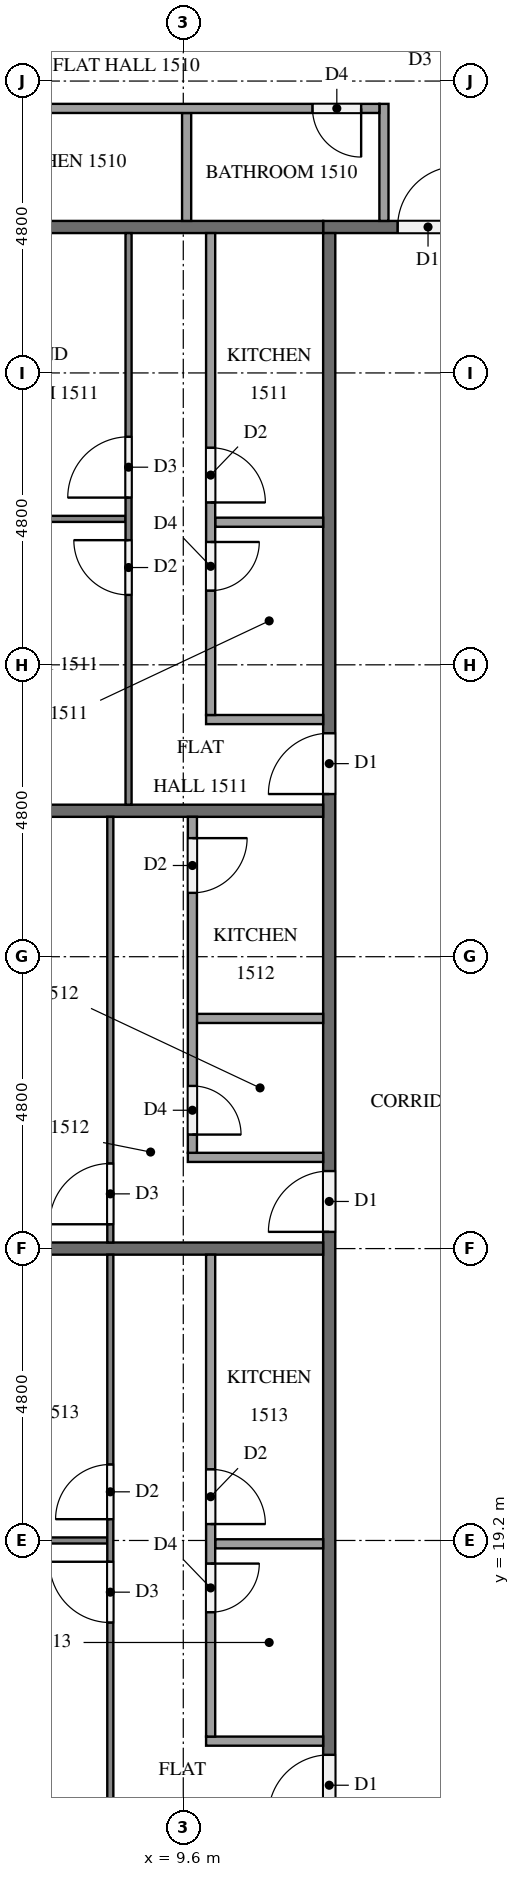
"""IFC4 building model, lengths in metres.
Left out: names, types, materials, properties, quantities, classifications, styles, units other than length and angle.
Written with IfcOpenShell. Run it as: python <this file> out.ifc"""

import sys

from ifc_helpers import new_model, si_unit, direction, frame, frame_2d, origin, place, context, subcontext, project, spatial, rectangle, extrude, element, fill, save


model = new_model("IFC4")
c1 = context("Model", 3, precision=1e-05, world=origin(), true_north=direction((0.0, 1.0)))
c2 = subcontext(c1, "Body", "Model", "MODEL_VIEW")
j1 = project(units=[si_unit("LENGTHUNIT", "METRE"), si_unit("PLANEANGLEUNIT", "RADIAN")], contexts=[c1])
p1 = place(None, origin())
s1 = spatial("IfcSite", under=j1, at=p1, CompositionType="ELEMENT")
p2 = place(p1, origin())
s2 = spatial("IfcBuilding", under=s1, at=p2, CompositionType="ELEMENT")
p3 = place(p2, frame((0.0, 0.0, 62.8)))
s3 = spatial("IfcBuildingStorey", under=s2, at=p3, CompositionType="ELEMENT", Elevation=62.8)
p4 = place(p3, frame((11.9, 40.8, 0.0), z_axis=(0.0, 0.0, 1.0), x_axis=(1.0, 0.0, 0.0)))
e1 = element("IfcWall", 1, at=p4, inside=s3, PredefinedType="PARTITIONING", context=c2, shape_type="SweptSolid", body=[
    extrude(rectangle(XDim=38.6, YDim=0.2, at=frame_2d((19.3, 0.0))), origin(), (0.0, 0.0, 1.0), 3.2),
])
p5 = place(p4, frame((36.375, 0.0, 0.0)))
e2 = element("IfcOpeningElement", 2, at=p5, cuts=e1, PredefinedType="OPENING", context=c2, shape_type="SweptSolid", body=[
    extrude(rectangle(XDim=1.0, YDim=2.1, at=frame_2d((0.5, 1.05))), frame((0.0, 0.11, 0.0), z_axis=(0.0, -1.0, 0.0), x_axis=(1.0, 0.0, 0.0)), (0.0, 0.0, 1.0), 0.22),
])
p6 = place(p4, frame((17.125, 0.0, 0.0)))
e3 = element("IfcOpeningElement", 3, at=p6, cuts=e1, PredefinedType="OPENING", context=c2, shape_type="SweptSolid", body=[
    extrude(rectangle(XDim=1.1, YDim=2.1, at=frame_2d((0.55, 1.05))), frame((0.0, 0.11, 0.0), z_axis=(0.0, -1.0, 0.0), x_axis=(1.0, 0.0, 0.0)), (0.0, 0.0, 1.0), 0.22),
])
p7 = place(p4, frame((15.625, 0.0, 0.0)))
e4 = element("IfcOpeningElement", 4, at=p7, cuts=e1, PredefinedType="OPENING", context=c2, shape_type="SweptSolid", body=[
    extrude(rectangle(XDim=1.0, YDim=2.1, at=frame_2d((0.5, 1.05))), frame((0.0, 0.11, 0.0), z_axis=(0.0, -1.0, 0.0), x_axis=(1.0, 0.0, 0.0)), (0.0, 0.0, 1.0), 0.22),
])
p8 = place(p4, frame((1.225, 0.0, 0.0)))
e5 = element("IfcOpeningElement", 5, at=p8, cuts=e1, PredefinedType="OPENING", context=c2, shape_type="SweptSolid", body=[
    extrude(rectangle(XDim=1.0, YDim=2.1, at=frame_2d((0.5, 1.05))), frame((0.0, 0.11, 0.0), z_axis=(0.0, -1.0, 0.0), x_axis=(1.0, 0.0, 0.0)), (0.0, 0.0, 1.0), 0.22),
])
p9 = place(p3, frame((12.0, 12.1, 0.0), z_axis=(0.0, 0.0, 1.0), x_axis=(0.0, 1.0, 0.0)))
e6 = element("IfcWall", 6, at=p9, inside=s3, PredefinedType="PARTITIONING", context=c2, shape_type="SweptSolid", body=[
    extrude(rectangle(XDim=28.6, YDim=0.2, at=frame_2d((14.3, 0.0))), origin(), (0.0, 0.0, 1.0), 3.2),
])
p10 = place(p9, frame((19.375, 0.0, 0.0)))
e7 = element("IfcOpeningElement", 7, at=p10, cuts=e6, PredefinedType="OPENING", context=c2, shape_type="SweptSolid", body=[
    extrude(rectangle(XDim=1.0, YDim=2.1, at=frame_2d((0.5, 1.05))), frame((0.0, 0.11, 0.0), z_axis=(0.0, -1.0, 0.0), x_axis=(1.0, 0.0, 0.0)), (0.0, 0.0, 1.0), 0.22),
])
p11 = place(p9, frame((12.175, 0.0, 0.0)))
e8 = element("IfcOpeningElement", 8, at=p11, cuts=e6, PredefinedType="OPENING", context=c2, shape_type="SweptSolid", body=[
    extrude(rectangle(XDim=1.0, YDim=2.1, at=frame_2d((0.5, 1.05))), frame((0.0, 0.11, 0.0), z_axis=(0.0, -1.0, 0.0), x_axis=(1.0, 0.0, 0.0)), (0.0, 0.0, 1.0), 0.22),
])
p12 = place(p9, frame((2.575, 0.0, 0.0)))
e9 = element("IfcOpeningElement", 9, at=p12, cuts=e6, PredefinedType="OPENING", context=c2, shape_type="SweptSolid", body=[
    extrude(rectangle(XDim=1.0, YDim=2.1, at=frame_2d((0.5, 1.05))), frame((0.0, 0.11, 0.0), z_axis=(0.0, -1.0, 0.0), x_axis=(1.0, 0.0, 0.0)), (0.0, 0.0, 1.0), 0.22),
])
p13 = place(p9, frame((1.025, 0.0, 0.0)))
e10 = element("IfcOpeningElement", 10, at=p13, cuts=e6, PredefinedType="OPENING", context=c2, shape_type="SweptSolid", body=[
    extrude(rectangle(XDim=1.0, YDim=2.1, at=frame_2d((0.5, 1.05))), frame((0.0, 0.11, 0.0), z_axis=(0.0, -1.0, 0.0), x_axis=(1.0, 0.0, 0.0)), (0.0, 0.0, 1.0), 0.22),
])
for number, where, z_axis, x_axis in (
    (11, (4.9, 40.8, 0.0), (0.0, 0.0, 1.0), (1.0, 0.0, 0.0)),
    (12, (4.9, 31.2, 0.0), (0.0, 0.0, 1.0), (1.0, 0.0, 0.0)),
):
    element("IfcWall", number, at=place(p3, frame(where, z_axis=z_axis, x_axis=x_axis)), inside=s3, PredefinedType="PARTITIONING", context=c2, shape_type="SweptSolid", body=[
        extrude(rectangle(XDim=7.0, YDim=0.2, at=frame_2d((3.5, 0.0))), origin(), (0.0, 0.0, 1.0), 3.2),
    ])
p14 = place(p3, frame((5.225, 24.0, 0.0), z_axis=(0.0, 0.0, 1.0), x_axis=(1.0, 0.0, 0.0)))
e13 = element("IfcWall", 13, at=p14, inside=s3, PredefinedType="PARTITIONING", context=c2, shape_type="SweptSolid", body=[
    extrude(rectangle(XDim=6.675, YDim=0.2, at=frame_2d((3.337, 0.0))), origin(), (0.0, 0.0, 1.0), 3.2),
])
p15 = place(p3, frame((9.655, 40.9, 0.0), z_axis=(0.0, 0.0, 1.0), x_axis=(0.0, 1.0, 0.0)))
e14 = element("IfcWall", 14, at=p15, inside=s3, PredefinedType="PARTITIONING", context=c2, shape_type="SweptSolid", body=[
    extrude(rectangle(XDim=1.775, YDim=0.15, at=frame_2d((0.888, 0.0))), origin(), (0.0, 0.0, 1.0), 3.2),
])
p16 = place(p3, frame((12.9, 40.9, 0.0), z_axis=(0.0, 0.0, 1.0), x_axis=(0.0, 1.0, 0.0)))
e15 = element("IfcWall", 15, at=p16, inside=s3, PredefinedType="PARTITIONING", context=c2, shape_type="SweptSolid", body=[
    extrude(rectangle(XDim=1.925, YDim=0.15, at=frame_2d((0.962, 0.0))), origin(), (0.0, 0.0, 1.0), 3.2),
])
p17 = place(p3, frame((12.825, 42.75, 0.0), z_axis=(0.0, 0.0, 1.0), x_axis=(-1.0, 0.0, 0.0)))
e16 = element("IfcWall", 16, at=p17, inside=s3, PredefinedType="PARTITIONING", context=c2, shape_type="SweptSolid", body=[
    extrude(rectangle(XDim=7.45, YDim=0.15, at=frame_2d((3.725, 0.0))), origin(), (0.0, 0.0, 1.0), 3.2),
])
p18 = place(p17, frame((0.3, 0.0, 0.0)))
e17 = element("IfcOpeningElement", 17, at=p18, cuts=e16, PredefinedType="OPENING", context=c2, shape_type="SweptSolid", body=[
    extrude(rectangle(XDim=0.8, YDim=2.1, at=frame_2d((0.4, 1.05))), frame((0.0, 0.085, 0.0), z_axis=(0.0, -1.0, 0.0), x_axis=(1.0, 0.0, 0.0)), (0.0, 0.0, 1.0), 0.17),
])
p19 = place(p17, frame((6.25, 0.0, 0.0)))
e18 = element("IfcOpeningElement", 18, at=p19, cuts=e16, PredefinedType="OPENING", context=c2, shape_type="SweptSolid", body=[
    extrude(rectangle(XDim=0.9, YDim=2.1, at=frame_2d((0.45, 1.05))), frame((0.0, 0.085, 0.0), z_axis=(0.0, -1.0, 0.0), x_axis=(1.0, 0.0, 0.0)), (0.0, 0.0, 1.0), 0.17),
])
p20 = place(p3, frame((8.65, 36.0, 0.0), z_axis=(0.0, 0.0, 1.0), x_axis=(-1.0, 0.0, 0.0)))
e19 = element("IfcWall", 19, at=p20, inside=s3, PredefinedType="PARTITIONING", context=c2, shape_type="SweptSolid", body=[
    extrude(rectangle(XDim=3.75, YDim=0.1, at=frame_2d((1.875, 0.0))), origin(), (0.0, 0.0, 1.0), 3.2),
])
p21 = place(p3, frame((8.7, 31.3, 0.0), z_axis=(0.0, 0.0, 1.0), x_axis=(0.0, 1.0, 0.0)))
e20 = element("IfcWall", 20, at=p21, inside=s3, PredefinedType="PARTITIONING", context=c2, shape_type="SweptSolid", body=[
    extrude(rectangle(XDim=9.4, YDim=0.1, at=frame_2d((4.7, 0.0))), origin(), (0.0, 0.0, 1.0), 3.2),
])
p22 = place(p21, frame((3.45, 0.0, 0.0)))
e21 = element("IfcOpeningElement", 21, at=p22, cuts=e20, PredefinedType="OPENING", context=c2, shape_type="SweptSolid", body=[
    extrude(rectangle(XDim=0.9, YDim=2.1, at=frame_2d((0.45, 1.05))), frame((0.0, 0.06, 0.0), z_axis=(0.0, -1.0, 0.0), x_axis=(1.0, 0.0, 0.0)), (0.0, 0.0, 1.0), 0.12),
])
p23 = place(p21, frame((5.05, 0.0, 0.0)))
e22 = element("IfcOpeningElement", 22, at=p23, cuts=e20, PredefinedType="OPENING", context=c2, shape_type="SweptSolid", body=[
    extrude(rectangle(XDim=1.0, YDim=2.1, at=frame_2d((0.5, 1.05))), frame((0.0, 0.06, 0.0), z_axis=(0.0, -1.0, 0.0), x_axis=(1.0, 0.0, 0.0)), (0.0, 0.0, 1.0), 0.12),
])
p24 = place(p3, frame((11.9, 35.945, 0.0), z_axis=(0.0, 0.0, 1.0), x_axis=(-1.0, 0.0, 0.0)))
e23 = element("IfcWall", 23, at=p24, inside=s3, PredefinedType="PARTITIONING", context=c2, shape_type="SweptSolid", body=[
    extrude(rectangle(XDim=1.775, YDim=0.15, at=frame_2d((0.887, 0.0))), origin(), (0.0, 0.0, 1.0), 3.2),
])
p25 = place(p3, frame((11.9, 32.7, 0.0), z_axis=(0.0, 0.0, 1.0), x_axis=(-1.0, 0.0, 0.0)))
e24 = element("IfcWall", 24, at=p25, inside=s3, PredefinedType="PARTITIONING", context=c2, shape_type="SweptSolid", body=[
    extrude(rectangle(XDim=1.925, YDim=0.15, at=frame_2d((0.962, 0.0))), origin(), (0.0, 0.0, 1.0), 3.2),
])
p26 = place(p3, frame((10.05, 40.7, 0.0), z_axis=(0.0, 0.0, 1.0), x_axis=(0.0, -1.0, 0.0)))
e25 = element("IfcWall", 25, at=p26, inside=s3, PredefinedType="PARTITIONING", context=c2, shape_type="SweptSolid", body=[
    extrude(rectangle(XDim=7.925, YDim=0.15, at=frame_2d((3.962, 0.0))), origin(), (0.0, 0.0, 1.0), 3.2),
])
p27 = place(p26, frame((5.08, 0.0, 0.0)))
e26 = element("IfcOpeningElement", 26, at=p27, cuts=e25, PredefinedType="OPENING", context=c2, shape_type="SweptSolid", body=[
    extrude(rectangle(XDim=0.8, YDim=2.1, at=frame_2d((0.4, 1.05))), frame((0.0, 0.085, 0.0), z_axis=(0.0, -1.0, 0.0), x_axis=(1.0, 0.0, 0.0)), (0.0, 0.0, 1.0), 0.17),
])
p28 = place(p26, frame((3.53, 0.0, 0.0)))
e27 = element("IfcOpeningElement", 27, at=p28, cuts=e25, PredefinedType="OPENING", context=c2, shape_type="SweptSolid", body=[
    extrude(rectangle(XDim=0.9, YDim=2.1, at=frame_2d((0.45, 1.05))), frame((0.0, 0.085, 0.0), z_axis=(0.0, -1.0, 0.0), x_axis=(1.0, 0.0, 0.0)), (0.0, 0.0, 1.0), 0.17),
])
p29 = place(p3, frame((8.4, 24.1, 0.0), z_axis=(0.0, 0.0, 1.0), x_axis=(0.0, 1.0, 0.0)))
e28 = element("IfcWall", 28, at=p29, inside=s3, PredefinedType="PARTITIONING", context=c2, shape_type="SweptSolid", body=[
    extrude(rectangle(XDim=7.0, YDim=0.1, at=frame_2d((3.5, 0.0))), origin(), (0.0, 0.0, 1.0), 3.2),
])
p30 = place(p29, frame((0.3, 0.0, 0.0)))
e29 = element("IfcOpeningElement", 29, at=p30, cuts=e28, PredefinedType="OPENING", context=c2, shape_type="SweptSolid", body=[
    extrude(rectangle(XDim=1.0, YDim=2.1, at=frame_2d((0.5, 1.05))), frame((0.0, 0.06, 0.0), z_axis=(0.0, -1.0, 0.0), x_axis=(1.0, 0.0, 0.0)), (0.0, 0.0, 1.0), 0.12),
])
p31 = place(p3, frame((11.9, 27.785, 0.0), z_axis=(0.0, 0.0, 1.0), x_axis=(-1.0, 0.0, 0.0)))
e30 = element("IfcWall", 30, at=p31, inside=s3, PredefinedType="PARTITIONING", context=c2, shape_type="SweptSolid", body=[
    extrude(rectangle(XDim=2.075, YDim=0.15, at=frame_2d((1.038, 0.0))), origin(), (0.0, 0.0, 1.0), 3.2),
])
p32 = place(p3, frame((11.9, 25.5, 0.0), z_axis=(0.0, 0.0, 1.0), x_axis=(-1.0, 0.0, 0.0)))
e31 = element("IfcWall", 31, at=p32, inside=s3, PredefinedType="PARTITIONING", context=c2, shape_type="SweptSolid", body=[
    extrude(rectangle(XDim=2.225, YDim=0.15, at=frame_2d((1.112, 0.0))), origin(), (0.0, 0.0, 1.0), 3.2),
])
p33 = place(p3, frame((9.75, 31.1, 0.0), z_axis=(0.0, 0.0, 1.0), x_axis=(0.0, -1.0, 0.0)))
e32 = element("IfcWall", 32, at=p33, inside=s3, PredefinedType="PARTITIONING", context=c2, shape_type="SweptSolid", body=[
    extrude(rectangle(XDim=5.525, YDim=0.15, at=frame_2d((2.763, 0.0))), origin(), (0.0, 0.0, 1.0), 3.2),
])
p34 = place(p33, frame((4.425, 0.0, 0.0)))
e33 = element("IfcOpeningElement", 33, at=p34, cuts=e32, PredefinedType="OPENING", context=c2, shape_type="SweptSolid", body=[
    extrude(rectangle(XDim=0.8, YDim=2.1, at=frame_2d((0.4, 1.05))), frame((0.0, 0.085, 0.0), z_axis=(0.0, -1.0, 0.0), x_axis=(1.0, 0.0, 0.0)), (0.0, 0.0, 1.0), 0.17),
])
p35 = place(p33, frame((0.35, 0.0, 0.0)))
e34 = element("IfcOpeningElement", 34, at=p35, cuts=e32, PredefinedType="OPENING", context=c2, shape_type="SweptSolid", body=[
    extrude(rectangle(XDim=0.9, YDim=2.1, at=frame_2d((0.45, 1.05))), frame((0.0, 0.085, 0.0), z_axis=(0.0, -1.0, 0.0), x_axis=(1.0, 0.0, 0.0)), (0.0, 0.0, 1.0), 0.17),
])
p36 = place(p3, frame((8.35, 19.2, 0.0), z_axis=(0.0, 0.0, 1.0), x_axis=(-1.0, 0.0, 0.0)))
e35 = element("IfcWall", 35, at=p36, inside=s3, PredefinedType="PARTITIONING", context=c2, shape_type="SweptSolid", body=[
    extrude(rectangle(XDim=3.45, YDim=0.1, at=frame_2d((1.725, 0.0))), origin(), (0.0, 0.0, 1.0), 3.2),
])
p37 = place(p3, frame((8.4, 14.5, 0.0), z_axis=(0.0, 0.0, 1.0), x_axis=(0.0, 1.0, 0.0)))
e36 = element("IfcWall", 36, at=p37, inside=s3, PredefinedType="PARTITIONING", context=c2, shape_type="SweptSolid", body=[
    extrude(rectangle(XDim=9.4, YDim=0.1, at=frame_2d((4.7, 0.0))), origin(), (0.0, 0.0, 1.0), 3.2),
])
p38 = place(p37, frame((3.35, 0.0, 0.0)))
e37 = element("IfcOpeningElement", 37, at=p38, cuts=e36, PredefinedType="OPENING", context=c2, shape_type="SweptSolid", body=[
    extrude(rectangle(XDim=1.0, YDim=2.1, at=frame_2d((0.5, 1.05))), frame((0.0, 0.06, 0.0), z_axis=(0.0, -1.0, 0.0), x_axis=(1.0, 0.0, 0.0)), (0.0, 0.0, 1.0), 0.12),
])
p39 = place(p37, frame((5.05, 0.0, 0.0)))
e38 = element("IfcOpeningElement", 38, at=p39, cuts=e36, PredefinedType="OPENING", context=c2, shape_type="SweptSolid", body=[
    extrude(rectangle(XDim=0.9, YDim=2.1, at=frame_2d((0.45, 1.05))), frame((0.0, 0.06, 0.0), z_axis=(0.0, -1.0, 0.0), x_axis=(1.0, 0.0, 0.0)), (0.0, 0.0, 1.0), 0.12),
])
p40 = place(p3, frame((11.9, 19.145, 0.0), z_axis=(0.0, 0.0, 1.0), x_axis=(-1.0, 0.0, 0.0)))
e39 = element("IfcWall", 39, at=p40, inside=s3, PredefinedType="PARTITIONING", context=c2, shape_type="SweptSolid", body=[
    extrude(rectangle(XDim=1.775, YDim=0.15, at=frame_2d((0.887, 0.0))), origin(), (0.0, 0.0, 1.0), 3.2),
])
p41 = place(p3, frame((11.9, 15.9, 0.0), z_axis=(0.0, 0.0, 1.0), x_axis=(-1.0, 0.0, 0.0)))
e40 = element("IfcWall", 40, at=p41, inside=s3, PredefinedType="PARTITIONING", context=c2, shape_type="SweptSolid", body=[
    extrude(rectangle(XDim=1.925, YDim=0.15, at=frame_2d((0.962, 0.0))), origin(), (0.0, 0.0, 1.0), 3.2),
])
p42 = place(p3, frame((10.05, 23.9, 0.0), z_axis=(0.0, 0.0, 1.0), x_axis=(0.0, -1.0, 0.0)))
e41 = element("IfcWall", 41, at=p42, inside=s3, PredefinedType="PARTITIONING", context=c2, shape_type="SweptSolid", body=[
    extrude(rectangle(XDim=7.925, YDim=0.15, at=frame_2d((3.962, 0.0))), origin(), (0.0, 0.0, 1.0), 3.2),
])
p43 = place(p42, frame((5.08, 0.0, 0.0)))
e42 = element("IfcOpeningElement", 42, at=p43, cuts=e41, PredefinedType="OPENING", context=c2, shape_type="SweptSolid", body=[
    extrude(rectangle(XDim=0.8, YDim=2.1, at=frame_2d((0.4, 1.05))), frame((0.0, 0.085, 0.0), z_axis=(0.0, -1.0, 0.0), x_axis=(1.0, 0.0, 0.0)), (0.0, 0.0, 1.0), 0.17),
])
p44 = place(p42, frame((3.53, 0.0, 0.0)))
e43 = element("IfcOpeningElement", 43, at=p44, cuts=e41, PredefinedType="OPENING", context=c2, shape_type="SweptSolid", body=[
    extrude(rectangle(XDim=0.9, YDim=2.1, at=frame_2d((0.45, 1.05))), frame((0.0, 0.085, 0.0), z_axis=(0.0, -1.0, 0.0), x_axis=(1.0, 0.0, 0.0)), (0.0, 0.0, 1.0), 0.17),
])
p45 = place(p8, origin())
e44 = element("IfcDoor", 44, at=p45, inside=s3, OperationType="SINGLE_SWING_RIGHT", PredefinedType="DOOR", context=c2, shape_type="SweptSolid", body=[
    extrude(rectangle(XDim=1.0, YDim=2.1, at=frame_2d((0.5, 1.05))), frame((0.0, 0.025, 0.0), z_axis=(0.0, -1.0, 0.0), x_axis=(1.0, 0.0, 0.0)), (0.0, 0.0, 1.0), 0.05),
])
fill(e5, e44)
p46 = place(p10, origin())
e45 = element("IfcDoor", 45, at=p46, inside=s3, OperationType="SINGLE_SWING_LEFT", PredefinedType="DOOR", context=c2, shape_type="SweptSolid", body=[
    extrude(rectangle(XDim=1.0, YDim=2.1, at=frame_2d((0.5, 1.05))), frame((0.0, 0.025, 0.0), z_axis=(0.0, -1.0, 0.0), x_axis=(1.0, 0.0, 0.0)), (0.0, 0.0, 1.0), 0.05),
])
fill(e7, e45)
p47 = place(p11, origin())
e46 = element("IfcDoor", 46, at=p47, inside=s3, OperationType="SINGLE_SWING_LEFT", PredefinedType="DOOR", context=c2, shape_type="SweptSolid", body=[
    extrude(rectangle(XDim=1.0, YDim=2.1, at=frame_2d((0.5, 1.05))), frame((0.0, 0.025, 0.0), z_axis=(0.0, -1.0, 0.0), x_axis=(1.0, 0.0, 0.0)), (0.0, 0.0, 1.0), 0.05),
])
fill(e8, e46)
p48 = place(p12, origin())
e47 = element("IfcDoor", 47, at=p48, inside=s3, OperationType="SINGLE_SWING_LEFT", PredefinedType="DOOR", context=c2, shape_type="SweptSolid", body=[
    extrude(rectangle(XDim=1.0, YDim=2.1, at=frame_2d((0.5, 1.05))), frame((0.0, 0.025, 0.0), z_axis=(0.0, -1.0, 0.0), x_axis=(1.0, 0.0, 0.0)), (0.0, 0.0, 1.0), 0.05),
])
fill(e9, e47)
p49 = place(p18, origin())
e48 = element("IfcDoor", 48, at=p49, inside=s3, OperationType="SINGLE_SWING_LEFT", PredefinedType="DOOR", context=c2, shape_type="SweptSolid", body=[
    extrude(rectangle(XDim=0.8, YDim=2.1, at=frame_2d((0.4, 1.05))), frame((0.0, 0.025, 0.0), z_axis=(0.0, -1.0, 0.0), x_axis=(1.0, 0.0, 0.0)), (0.0, 0.0, 1.0), 0.05),
])
fill(e17, e48)
p50 = place(p22, origin())
e49 = element("IfcDoor", 49, at=p50, inside=s3, OperationType="SINGLE_SWING_RIGHT", PredefinedType="DOOR", context=c2, shape_type="SweptSolid", body=[
    extrude(rectangle(XDim=0.9, YDim=2.1, at=frame_2d((0.45, 1.05))), frame((0.0, 0.025, 0.0), z_axis=(0.0, -1.0, 0.0), x_axis=(1.0, 0.0, 0.0)), (0.0, 0.0, 1.0), 0.05),
])
fill(e21, e49)
p51 = place(p23, origin())
e50 = element("IfcDoor", 50, at=p51, inside=s3, OperationType="SINGLE_SWING_LEFT", PredefinedType="DOOR", context=c2, shape_type="SweptSolid", body=[
    extrude(rectangle(XDim=1.0, YDim=2.1, at=frame_2d((0.5, 1.05))), frame((0.0, 0.025, 0.0), z_axis=(0.0, -1.0, 0.0), x_axis=(1.0, 0.0, 0.0)), (0.0, 0.0, 1.0), 0.05),
])
fill(e22, e50)
p52 = place(p27, origin())
e51 = element("IfcDoor", 51, at=p52, inside=s3, OperationType="SINGLE_SWING_LEFT", PredefinedType="DOOR", context=c2, shape_type="SweptSolid", body=[
    extrude(rectangle(XDim=0.8, YDim=2.1, at=frame_2d((0.4, 1.05))), frame((0.0, 0.025, 0.0), z_axis=(0.0, -1.0, 0.0), x_axis=(1.0, 0.0, 0.0)), (0.0, 0.0, 1.0), 0.05),
])
fill(e26, e51)
p53 = place(p28, origin())
e52 = element("IfcDoor", 52, at=p53, inside=s3, OperationType="SINGLE_SWING_RIGHT", PredefinedType="DOOR", context=c2, shape_type="SweptSolid", body=[
    extrude(rectangle(XDim=0.9, YDim=2.1, at=frame_2d((0.45, 1.05))), frame((0.0, 0.025, 0.0), z_axis=(0.0, -1.0, 0.0), x_axis=(1.0, 0.0, 0.0)), (0.0, 0.0, 1.0), 0.05),
])
fill(e27, e52)
p54 = place(p30, origin())
e53 = element("IfcDoor", 53, at=p54, inside=s3, OperationType="SINGLE_SWING_LEFT", PredefinedType="DOOR", context=c2, shape_type="SweptSolid", body=[
    extrude(rectangle(XDim=1.0, YDim=2.1, at=frame_2d((0.5, 1.05))), frame((0.0, 0.025, 0.0), z_axis=(0.0, -1.0, 0.0), x_axis=(1.0, 0.0, 0.0)), (0.0, 0.0, 1.0), 0.05),
])
fill(e29, e53)
p55 = place(p34, origin())
e54 = element("IfcDoor", 54, at=p55, inside=s3, OperationType="SINGLE_SWING_RIGHT", PredefinedType="DOOR", context=c2, shape_type="SweptSolid", body=[
    extrude(rectangle(XDim=0.8, YDim=2.1, at=frame_2d((0.4, 1.05))), frame((0.0, 0.025, 0.0), z_axis=(0.0, -1.0, 0.0), x_axis=(1.0, 0.0, 0.0)), (0.0, 0.0, 1.0), 0.05),
])
fill(e33, e54)
p56 = place(p35, origin())
e55 = element("IfcDoor", 55, at=p56, inside=s3, OperationType="SINGLE_SWING_LEFT", PredefinedType="DOOR", context=c2, shape_type="SweptSolid", body=[
    extrude(rectangle(XDim=0.9, YDim=2.1, at=frame_2d((0.45, 1.05))), frame((0.0, 0.025, 0.0), z_axis=(0.0, -1.0, 0.0), x_axis=(1.0, 0.0, 0.0)), (0.0, 0.0, 1.0), 0.05),
])
fill(e34, e55)
p57 = place(p38, origin())
e56 = element("IfcDoor", 56, at=p57, inside=s3, OperationType="SINGLE_SWING_RIGHT", PredefinedType="DOOR", context=c2, shape_type="SweptSolid", body=[
    extrude(rectangle(XDim=1.0, YDim=2.1, at=frame_2d((0.5, 1.05))), frame((0.0, 0.025, 0.0), z_axis=(0.0, -1.0, 0.0), x_axis=(1.0, 0.0, 0.0)), (0.0, 0.0, 1.0), 0.05),
])
fill(e37, e56)
p58 = place(p39, origin())
e57 = element("IfcDoor", 57, at=p58, inside=s3, OperationType="SINGLE_SWING_LEFT", PredefinedType="DOOR", context=c2, shape_type="SweptSolid", body=[
    extrude(rectangle(XDim=0.9, YDim=2.1, at=frame_2d((0.45, 1.05))), frame((0.0, 0.025, 0.0), z_axis=(0.0, -1.0, 0.0), x_axis=(1.0, 0.0, 0.0)), (0.0, 0.0, 1.0), 0.05),
])
fill(e38, e57)
p59 = place(p43, origin())
e58 = element("IfcDoor", 58, at=p59, inside=s3, OperationType="SINGLE_SWING_LEFT", PredefinedType="DOOR", context=c2, shape_type="SweptSolid", body=[
    extrude(rectangle(XDim=0.8, YDim=2.1, at=frame_2d((0.4, 1.05))), frame((0.0, 0.025, 0.0), z_axis=(0.0, -1.0, 0.0), x_axis=(1.0, 0.0, 0.0)), (0.0, 0.0, 1.0), 0.05),
])
fill(e42, e58)
p60 = place(p44, origin())
e59 = element("IfcDoor", 59, at=p60, inside=s3, OperationType="SINGLE_SWING_RIGHT", PredefinedType="DOOR", context=c2, shape_type="SweptSolid", body=[
    extrude(rectangle(XDim=0.9, YDim=2.1, at=frame_2d((0.45, 1.05))), frame((0.0, 0.025, 0.0), z_axis=(0.0, -1.0, 0.0), x_axis=(1.0, 0.0, 0.0)), (0.0, 0.0, 1.0), 0.05),
])
fill(e43, e59)
save(model, sys.argv[1])
